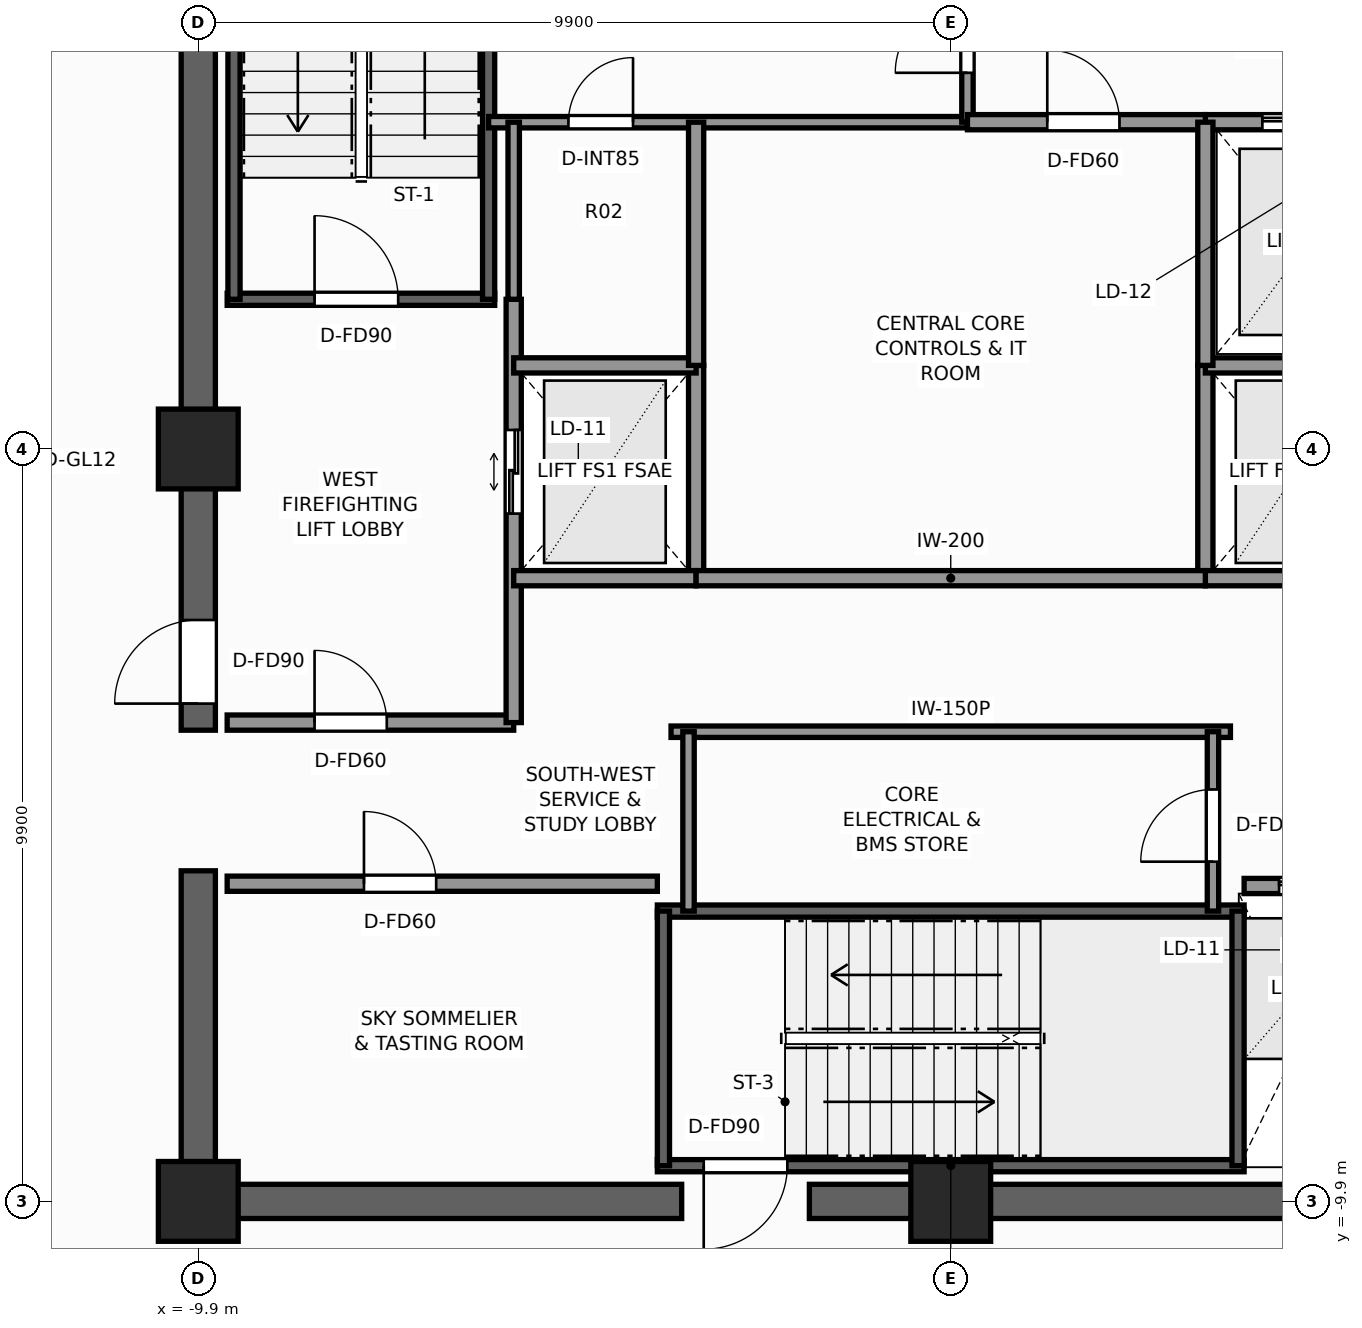
"""IFC4 building model, lengths in metres.
Left out: names, types, materials, properties, quantities, classifications, styles, units other than length and angle.
Written with IfcOpenShell. Run it as: python <this file> out.ifc"""

import sys

from ifc_helpers import new_model, si_unit, direction, frame, frame_2d, origin, origin_2d, place, context, subcontext, project, spatial, rectangle, extrude, element, fill, save


model = new_model("IFC4")
c1 = context("Model", 3, precision=1e-05, world=origin(), true_north=direction((0.0, 1.0)))
c2 = subcontext(c1, "Body", "Model", "MODEL_VIEW")
j1 = project(units=[si_unit("LENGTHUNIT", "METRE"), si_unit("PLANEANGLEUNIT", "RADIAN")], contexts=[c1])
p1 = place(None, origin())
s1 = spatial("IfcSite", under=j1, at=p1, CompositionType="ELEMENT")
p2 = place(p1, origin())
s2 = spatial("IfcBuilding", under=s1, at=p2, CompositionType="ELEMENT")
p3 = place(p2, frame((0.0, 0.0, 262.8)))
s3 = spatial("IfcBuildingStorey", under=s2, at=p3, CompositionType="ELEMENT", Elevation=262.8)
p4 = place(p3, frame((10.125, -9.9, 0.0), z_axis=(0.0, 0.0, 1.0), x_axis=(-1.0, 0.0, 0.0)))
e1 = element("IfcWall", 1, at=p4, inside=s3, PredefinedType="SHEAR", context=c2, shape_type="SweptSolid", body=[
    extrude(rectangle(XDim=11.985, YDim=0.45, at=frame_2d((5.993, 0.0))), origin(), (0.0, 0.0, 1.0), 4.6),
])
p5 = place(p3, frame((-3.54, -9.9, 0.0), z_axis=(0.0, 0.0, 1.0), x_axis=(-1.0, 0.0, 0.0)))
e2 = element("IfcWall", 2, at=p5, inside=s3, PredefinedType="SHEAR", context=c2, shape_type="SweptSolid", body=[
    extrude(rectangle(XDim=6.585, YDim=0.45, at=frame_2d((3.292, 0.0))), origin(), (0.0, 0.0, 1.0), 4.6),
])
p6 = place(p3, frame((-9.9, -9.675, 0.0), z_axis=(0.0, 0.0, 1.0), x_axis=(0.0, 1.0, 0.0)))
e3 = element("IfcWall", 3, at=p6, inside=s3, PredefinedType="SHEAR", context=c2, shape_type="SweptSolid", body=[
    extrude(rectangle(XDim=4.125, YDim=0.45, at=frame_2d((2.062, 0.0))), origin(), (0.0, 0.0, 1.0), 4.6),
])
p7 = place(p3, frame((-9.9, -3.7, 0.0), z_axis=(0.0, 0.0, 1.0), x_axis=(0.0, 1.0, 0.0)))
e4 = element("IfcWall", 4, at=p7, inside=s3, PredefinedType="SHEAR", context=c2, shape_type="SweptSolid", body=[
    extrude(rectangle(XDim=13.375, YDim=0.45, at=frame_2d((6.688, 0.0))), origin(), (0.0, 0.0, 1.0), 4.6),
])
p8 = place(p7, frame((0.35, 0.0, 0.0)))
e5 = element("IfcOpeningElement", 5, at=p8, cuts=e4, PredefinedType="OPENING", context=c2, shape_type="SweptSolid", body=[
    extrude(rectangle(XDim=1.1, YDim=2.2, at=frame_2d((0.55, 1.1))), frame((0.0, 0.235, 0.0), z_axis=(0.0, -1.0, 0.0), x_axis=(1.0, 0.0, 0.0)), (0.0, 0.0, 1.0), 0.47),
])
for number, where, z_axis, x_axis in (
    (6, (-9.9, -9.9, 0.0), (0.0, 0.0, 1.0), (1.0, 0.0, 0.0)),
    (7, (0.0, -9.9, 0.0), (0.0, 0.0, 1.0), (1.0, 0.0, 0.0)),
    (8, (-9.9, 0.0, 0.0), (0.0, 0.0, 1.0), (1.0, 0.0, 0.0)),
):
    element("IfcColumn", number, at=place(p3, frame(where, z_axis=z_axis, x_axis=x_axis)), inside=s3, PredefinedType="COLUMN", context=c2, shape_type="SweptSolid", body=[
        extrude(rectangle(XDim=1.05, YDim=1.05, at=origin_2d()), origin(), (0.0, 0.0, 1.0), 4.6),
    ])
p9 = place(p3, frame((-9.52, 1.97, 0.0), z_axis=(0.0, 0.0, 1.0), x_axis=(1.0, 0.0, 0.0)))
e9 = element("IfcWall", 9, at=p9, inside=s3, PredefinedType="SHEAR", context=c2, shape_type="SweptSolid", body=[
    extrude(rectangle(XDim=3.52, YDim=0.16, at=frame_2d((1.76, 0.0))), origin(), (0.0, 0.0, 1.0), 4.6),
])
p10 = place(p9, frame((1.15, 0.0, 0.0)))
e10 = element("IfcOpeningElement", 10, at=p10, cuts=e9, PredefinedType="OPENING", context=c2, shape_type="SweptSolid", body=[
    extrude(rectangle(XDim=1.1, YDim=2.2, at=frame_2d((0.55, 1.1))), frame((0.0, 0.09, 0.0), z_axis=(0.0, -1.0, 0.0), x_axis=(1.0, 0.0, 0.0)), (0.0, 0.0, 1.0), 0.18),
])
for number, where, z_axis, x_axis in (
    (11, (-9.43, 1.97, 0.0), (0.0, 0.0, 1.0), (0.0, 1.0, 0.0)),
    (12, (-6.08, 1.97, 0.0), (0.0, 0.0, 1.0), (0.0, 1.0, 0.0)),
):
    element("IfcWall", number, at=place(p3, frame(where, z_axis=z_axis, x_axis=x_axis)), inside=s3, PredefinedType="SHEAR", context=c2, shape_type="SweptSolid", body=[
        extrude(rectangle(XDim=7.56, YDim=0.16, at=frame_2d((3.78, 0.0))), origin(), (0.0, 0.0, 1.0), 4.6),
    ])
p11 = place(p3, frame((3.86, -9.43, 0.0), z_axis=(0.0, 0.0, 1.0), x_axis=(-1.0, 0.0, 0.0)))
e13 = element("IfcWall", 13, at=p11, inside=s3, PredefinedType="SHEAR", context=c2, shape_type="SweptSolid", body=[
    extrude(rectangle(XDim=7.72, YDim=0.16, at=frame_2d((3.86, 0.0))), origin(), (0.0, 0.0, 1.0), 4.6),
])
p12 = place(p11, frame((6.01, 0.0, 0.0)))
e14 = element("IfcOpeningElement", 14, at=p12, cuts=e13, PredefinedType="OPENING", context=c2, shape_type="SweptSolid", body=[
    extrude(rectangle(XDim=1.1, YDim=2.2, at=frame_2d((0.55, 1.1))), frame((0.0, 0.09, 0.0), z_axis=(0.0, -1.0, 0.0), x_axis=(1.0, 0.0, 0.0)), (0.0, 0.0, 1.0), 0.18),
])
p13 = place(p3, frame((-3.86, -6.08, 0.0), z_axis=(0.0, 0.0, 1.0), x_axis=(1.0, 0.0, 0.0)))
e15 = element("IfcWall", 15, at=p13, inside=s3, PredefinedType="SHEAR", context=c2, shape_type="SweptSolid", body=[
    extrude(rectangle(XDim=7.72, YDim=0.16, at=frame_2d((3.86, 0.0))), origin(), (0.0, 0.0, 1.0), 4.6),
])
for number, where, z_axis, x_axis in (
    (16, (-3.78, -9.43, 0.0), (0.0, 0.0, 1.0), (0.0, 1.0, 0.0)),
    (17, (3.78, -9.43, 0.0), (0.0, 0.0, 1.0), (0.0, 1.0, 0.0)),
):
    element("IfcWall", number, at=place(p3, frame(where, z_axis=z_axis, x_axis=x_axis)), inside=s3, PredefinedType="SHEAR", context=c2, shape_type="SweptSolid", body=[
        extrude(rectangle(XDim=3.35, YDim=0.16, at=frame_2d((1.675, 0.0))), origin(), (0.0, 0.0, 1.0), 4.6),
    ])
p14 = place(p3, frame((-9.52, -3.6, 0.0), z_axis=(0.0, 0.0, 1.0), x_axis=(1.0, 0.0, 0.0)))
e18 = element("IfcWall", 18, at=p14, inside=s3, PredefinedType="SOLIDWALL", context=c2, shape_type="SweptSolid", body=[
    extrude(rectangle(XDim=3.77, YDim=0.2, at=frame_2d((1.885, 0.0))), origin(), (0.0, 0.0, 1.0), 4.32),
])
p15 = place(p14, frame((1.15, 0.0, 0.0)))
e19 = element("IfcOpeningElement", 19, at=p15, cuts=e18, PredefinedType="OPENING", context=c2, shape_type="SweptSolid", body=[
    extrude(rectangle(XDim=0.95, YDim=2.06, at=frame_2d((0.475, 1.03))), frame((0.0, 0.11, 0.0), z_axis=(0.0, -1.0, 0.0), x_axis=(1.0, 0.0, 0.0)), (0.0, 0.0, 1.0), 0.22),
])
p16 = place(p3, frame((-5.75, -3.6, 0.0), z_axis=(0.0, 0.0, 1.0), x_axis=(0.0, 1.0, 0.0)))
e20 = element("IfcWall", 20, at=p16, inside=s3, PredefinedType="SOLIDWALL", context=c2, shape_type="SweptSolid", body=[
    extrude(rectangle(XDim=5.57, YDim=0.2, at=frame_2d((2.785, 0.0))), origin(), (0.0, 0.0, 1.0), 4.32),
])
p17 = place(p16, frame((2.75, 0.0, 0.0)))
e21 = element("IfcOpeningElement", 21, at=p17, cuts=e20, PredefinedType="OPENING", context=c2, shape_type="SweptSolid", body=[
    extrude(rectangle(XDim=1.1, YDim=2.2, at=frame_2d((0.55, 1.1))), frame((0.0, 0.11, 0.0), z_axis=(0.0, -1.0, 0.0), x_axis=(1.0, 0.0, 0.0)), (0.0, 0.0, 1.0), 0.22),
])
p18 = place(p3, frame((-3.35, -1.7, 0.0), z_axis=(0.0, 0.0, 1.0), x_axis=(0.0, 1.0, 0.0)))
e22 = element("IfcWall", 22, at=p18, inside=s3, PredefinedType="SOLIDWALL", context=c2, shape_type="SweptSolid", body=[
    extrude(rectangle(XDim=2.8, YDim=0.2, at=frame_2d((1.4, 0.0))), origin(), (0.0, 0.0, 1.0), 4.32),
])
for number, where, z_axis, x_axis in (
    (23, (-5.75, -1.7, 0.0), (0.0, 0.0, 1.0), (1.0, 0.0, 0.0)),
    (24, (-5.75, 1.1, 0.0), (0.0, 0.0, 1.0), (1.0, 0.0, 0.0)),
):
    element("IfcWall", number, at=place(p3, frame(where, z_axis=z_axis, x_axis=x_axis)), inside=s3, PredefinedType="SOLIDWALL", context=c2, shape_type="SweptSolid", body=[
        extrude(rectangle(XDim=2.4, YDim=0.2, at=frame_2d((1.2, 0.0))), origin(), (0.0, 0.0, 1.0), 4.32),
    ])
p19 = place(p3, frame((3.35, -1.7, 0.0), z_axis=(0.0, 0.0, 1.0), x_axis=(0.0, 1.0, 0.0)))
e25 = element("IfcWall", 25, at=p19, inside=s3, PredefinedType="SOLIDWALL", context=c2, shape_type="SweptSolid", body=[
    extrude(rectangle(XDim=2.8, YDim=0.2, at=frame_2d((1.4, 0.0))), origin(), (0.0, 0.0, 1.0), 4.32),
])
for number, where, z_axis, x_axis in (
    (26, (3.35, -1.7, 0.0), (0.0, 0.0, 1.0), (1.0, 0.0, 0.0)),
    (27, (3.35, 1.1, 0.0), (0.0, 0.0, 1.0), (1.0, 0.0, 0.0)),
):
    element("IfcWall", number, at=place(p3, frame(where, z_axis=z_axis, x_axis=x_axis)), inside=s3, PredefinedType="SOLIDWALL", context=c2, shape_type="SweptSolid", body=[
        extrude(rectangle(XDim=2.4, YDim=0.2, at=frame_2d((1.2, 0.0))), origin(), (0.0, 0.0, 1.0), 4.32),
    ])
p20 = place(p3, frame((3.35, 4.3, 0.0), z_axis=(0.0, 0.0, 1.0), x_axis=(1.0, 0.0, 0.0)))
e28 = element("IfcWall", 28, at=p20, inside=s3, PredefinedType="SOLIDWALL", context=c2, shape_type="SweptSolid", body=[
    extrude(rectangle(XDim=2.73, YDim=0.2, at=frame_2d((1.365, 0.0))), origin(), (0.0, 0.0, 1.0), 4.32),
])
p21 = place(p20, frame((0.75, 0.0, 0.0)))
e29 = element("IfcOpeningElement", 29, at=p21, cuts=e28, PredefinedType="OPENING", context=c2, shape_type="SweptSolid", body=[
    extrude(rectangle(XDim=1.2, YDim=2.25, at=frame_2d((0.6, 1.125))), frame((0.0, 0.11, 0.0), z_axis=(0.0, -1.0, 0.0), x_axis=(1.0, 0.0, 0.0)), (0.0, 0.0, 1.0), 0.22),
])
p22 = place(p3, frame((-6.08, 4.3, 0.0), z_axis=(0.0, 0.0, 1.0), x_axis=(1.0, 0.0, 0.0)))
e30 = element("IfcWall", 30, at=p22, inside=s3, PredefinedType="PARTITIONING", context=c2, shape_type="SweptSolid", body=[
    extrude(rectangle(XDim=6.3, YDim=0.15, at=frame_2d((3.15, 0.0))), origin(), (0.0, 0.0, 1.0), 4.32),
])
p23 = place(p22, frame((1.05, 0.0, 0.0)))
e31 = element("IfcOpeningElement", 31, at=p23, cuts=e30, PredefinedType="OPENING", context=c2, shape_type="SweptSolid", body=[
    extrude(rectangle(XDim=0.85, YDim=2.03, at=frame_2d((0.425, 1.015))), frame((0.0, 0.085, 0.0), z_axis=(0.0, -1.0, 0.0), x_axis=(1.0, 0.0, 0.0)), (0.0, 0.0, 1.0), 0.17),
])
p24 = place(p3, frame((0.22, 4.3, 0.0), z_axis=(0.0, 0.0, 1.0), x_axis=(0.0, 1.0, 0.0)))
e32 = element("IfcWall", 32, at=p24, inside=s3, PredefinedType="PARTITIONING", context=c2, shape_type="SweptSolid", body=[
    extrude(rectangle(XDim=5.22, YDim=0.15, at=frame_2d((2.61, 0.0))), origin(), (0.0, 0.0, 1.0), 4.32),
])
p25 = place(p24, frame((0.65, 0.0, 0.0)))
e33 = element("IfcOpeningElement", 33, at=p25, cuts=e32, PredefinedType="OPENING", context=c2, shape_type="SweptSolid", body=[
    extrude(rectangle(XDim=0.95, YDim=2.06, at=frame_2d((0.475, 1.03))), frame((0.0, 0.085, 0.0), z_axis=(0.0, -1.0, 0.0), x_axis=(1.0, 0.0, 0.0)), (0.0, 0.0, 1.0), 0.17),
])
p26 = place(p3, frame((-9.52, -5.72, 0.0), z_axis=(0.0, 0.0, 1.0), x_axis=(1.0, 0.0, 0.0)))
e34 = element("IfcWall", 34, at=p26, inside=s3, PredefinedType="SOLIDWALL", context=c2, shape_type="SweptSolid", body=[
    extrude(rectangle(XDim=5.66, YDim=0.2, at=frame_2d((2.83, 0.0))), origin(), (0.0, 0.0, 1.0), 4.32),
])
p27 = place(p26, frame((1.8, 0.0, 0.0)))
e35 = element("IfcOpeningElement", 35, at=p27, cuts=e34, PredefinedType="OPENING", context=c2, shape_type="SweptSolid", body=[
    extrude(rectangle(XDim=0.95, YDim=2.06, at=frame_2d((0.475, 1.03))), frame((0.0, 0.11, 0.0), z_axis=(0.0, -1.0, 0.0), x_axis=(1.0, 0.0, 0.0)), (0.0, 0.0, 1.0), 0.22),
])
p28 = place(p3, frame((3.86, -5.75, 0.0), z_axis=(0.0, 0.0, 1.0), x_axis=(1.0, 0.0, 0.0)))
e36 = element("IfcWall", 36, at=p28, inside=s3, PredefinedType="SOLIDWALL", context=c2, shape_type="SweptSolid", body=[
    extrude(rectangle(XDim=5.66, YDim=0.2, at=frame_2d((2.83, 0.0))), origin(), (0.0, 0.0, 1.0), 4.32),
])
p29 = place(p28, frame((0.46, 0.0, 0.0)))
e37 = element("IfcOpeningElement", 37, at=p29, cuts=e36, PredefinedType="OPENING", context=c2, shape_type="SweptSolid", body=[
    extrude(rectangle(XDim=1.1, YDim=2.2, at=frame_2d((0.55, 1.1))), frame((0.0, 0.11, 0.0), z_axis=(0.0, -1.0, 0.0), x_axis=(1.0, 0.0, 0.0)), (0.0, 0.0, 1.0), 0.22),
])
p30 = place(p28, frame((2.39, 0.0, 0.0)))
e38 = element("IfcOpeningElement", 38, at=p30, cuts=e36, PredefinedType="OPENING", context=c2, shape_type="SweptSolid", body=[
    extrude(rectangle(XDim=1.1, YDim=2.2, at=frame_2d((0.55, 1.1))), frame((0.0, 0.11, 0.0), z_axis=(0.0, -1.0, 0.0), x_axis=(1.0, 0.0, 0.0)), (0.0, 0.0, 1.0), 0.22),
])
p31 = place(p28, frame((4.32, 0.0, 0.0)))
e39 = element("IfcOpeningElement", 39, at=p31, cuts=e36, PredefinedType="OPENING", context=c2, shape_type="SweptSolid", body=[
    extrude(rectangle(XDim=1.1, YDim=2.2, at=frame_2d((0.55, 1.1))), frame((0.0, 0.11, 0.0), z_axis=(0.0, -1.0, 0.0), x_axis=(1.0, 0.0, 0.0)), (0.0, 0.0, 1.0), 0.22),
])
p32 = place(p3, frame((0.22, 4.3, 0.0), z_axis=(0.0, 0.0, 1.0), x_axis=(1.0, 0.0, 0.0)))
e40 = element("IfcWall", 40, at=p32, inside=s3, PredefinedType="SOLIDWALL", context=c2, shape_type="SweptSolid", body=[
    extrude(rectangle(XDim=3.13, YDim=0.2, at=frame_2d((1.565, 0.0))), origin(), (0.0, 0.0, 1.0), 4.32),
])
p33 = place(p32, frame((1.05, 0.0, 0.0)))
e41 = element("IfcOpeningElement", 41, at=p33, cuts=e40, PredefinedType="OPENING", context=c2, shape_type="SweptSolid", body=[
    extrude(rectangle(XDim=0.95, YDim=2.06, at=frame_2d((0.475, 1.03))), frame((0.0, 0.11, 0.0), z_axis=(0.0, -1.0, 0.0), x_axis=(1.0, 0.0, 0.0)), (0.0, 0.0, 1.0), 0.22),
])
p34 = place(p3, frame((-3.35, -1.7, 0.0), z_axis=(0.0, 0.0, 1.0), x_axis=(1.0, 0.0, 0.0)))
e42 = element("IfcWall", 42, at=p34, inside=s3, PredefinedType="SOLIDWALL", context=c2, shape_type="SweptSolid", body=[
    extrude(rectangle(XDim=6.7, YDim=0.2, at=frame_2d((3.35, 0.0))), origin(), (0.0, 0.0, 1.0), 4.32),
])
for number, where, z_axis, x_axis in (
    (43, (-3.35, 1.1, 0.0), (0.0, 0.0, 1.0), (0.0, 1.0, 0.0)),
    (44, (3.35, 1.1, 0.0), (0.0, 0.0, 1.0), (0.0, 1.0, 0.0)),
):
    element("IfcWall", number, at=place(p3, frame(where, z_axis=z_axis, x_axis=x_axis)), inside=s3, PredefinedType="SOLIDWALL", context=c2, shape_type="SweptSolid", body=[
        extrude(rectangle(XDim=3.2, YDim=0.2, at=frame_2d((1.6, 0.0))), origin(), (0.0, 0.0, 1.0), 4.32),
    ])
p35 = place(p3, frame((-3.68, -3.72, 0.0), z_axis=(0.0, 0.0, 1.0), x_axis=(1.0, 0.0, 0.0)))
e45 = element("IfcWall", 45, at=p35, inside=s3, PredefinedType="PARTITIONING", context=c2, shape_type="SweptSolid", body=[
    extrude(rectangle(XDim=7.36, YDim=0.15, at=frame_2d((3.68, 0.0))), origin(), (0.0, 0.0, 1.0), 4.32),
])
p36 = place(p3, frame((3.45, -6.08, 0.0), z_axis=(0.0, 0.0, 1.0), x_axis=(0.0, 1.0, 0.0)))
e46 = element("IfcWall", 46, at=p36, inside=s3, PredefinedType="PARTITIONING", context=c2, shape_type="SweptSolid", body=[
    extrude(rectangle(XDim=2.36, YDim=0.15, at=frame_2d((1.18, 0.0))), origin(), (0.0, 0.0, 1.0), 4.32),
])
p37 = place(p36, frame((0.65, 0.0, 0.0)))
e47 = element("IfcOpeningElement", 47, at=p37, cuts=e46, PredefinedType="OPENING", context=c2, shape_type="SweptSolid", body=[
    extrude(rectangle(XDim=0.95, YDim=2.06, at=frame_2d((0.475, 1.03))), frame((0.0, 0.085, 0.0), z_axis=(0.0, -1.0, 0.0), x_axis=(1.0, 0.0, 0.0)), (0.0, 0.0, 1.0), 0.17),
])
p38 = place(p3, frame((-3.45, -6.08, 0.0), z_axis=(0.0, 0.0, 1.0), x_axis=(0.0, 1.0, 0.0)))
e48 = element("IfcWall", 48, at=p38, inside=s3, PredefinedType="PARTITIONING", context=c2, shape_type="SweptSolid", body=[
    extrude(rectangle(XDim=2.36, YDim=0.15, at=frame_2d((1.18, 0.0))), origin(), (0.0, 0.0, 1.0), 4.32),
])
p39 = place(p3, frame((-5.75, 1.97, 0.0), z_axis=(0.0, 0.0, 1.0), x_axis=(0.0, 1.0, 0.0)))
e49 = element("IfcWall", 49, at=p39, inside=s3, PredefinedType="PARTITIONING", context=c2, shape_type="SweptSolid", body=[
    extrude(rectangle(XDim=2.33, YDim=0.15, at=frame_2d((1.165, 0.0))), origin(), (0.0, 0.0, 1.0), 4.32),
])
p40 = place(p10, origin())
e50 = element("IfcDoor", 50, at=p40, inside=s3, OperationType="SINGLE_SWING_LEFT", PredefinedType="DOOR", context=c2, shape_type="SweptSolid", body=[
    extrude(rectangle(XDim=1.1, YDim=2.2, at=frame_2d((0.55, 1.1))), frame((0.0, 0.025, 0.0), z_axis=(0.0, -1.0, 0.0), x_axis=(1.0, 0.0, 0.0)), (0.0, 0.0, 1.0), 0.05),
])
fill(e10, e50)
p41 = place(p12, origin())
e51 = element("IfcDoor", 51, at=p41, inside=s3, OperationType="SINGLE_SWING_RIGHT", PredefinedType="DOOR", context=c2, shape_type="SweptSolid", body=[
    extrude(rectangle(XDim=1.1, YDim=2.2, at=frame_2d((0.55, 1.1))), frame((0.0, 0.025, 0.0), z_axis=(0.0, -1.0, 0.0), x_axis=(1.0, 0.0, 0.0)), (0.0, 0.0, 1.0), 0.05),
])
fill(e14, e51)
p42 = place(p8, origin())
e52 = element("IfcDoor", 52, at=p42, inside=s3, OperationType="SINGLE_SWING_LEFT", PredefinedType="DOOR", context=c2, shape_type="SweptSolid", body=[
    extrude(rectangle(XDim=1.1, YDim=2.2, at=frame_2d((0.55, 1.1))), frame((0.0, 0.025, 0.0), z_axis=(0.0, -1.0, 0.0), x_axis=(1.0, 0.0, 0.0)), (0.0, 0.0, 1.0), 0.05),
])
fill(e5, e52)
p43 = place(p17, origin())
e53 = element("IfcDoor", 53, at=p43, inside=s3, OperationType="DOUBLE_DOOR_SLIDING", PredefinedType="DOOR", context=c2, shape_type="SweptSolid", body=[
    extrude(rectangle(XDim=1.1, YDim=2.2, at=frame_2d((0.55, 1.1))), frame((0.0, 0.025, 0.0), z_axis=(0.0, -1.0, 0.0), x_axis=(1.0, 0.0, 0.0)), (0.0, 0.0, 1.0), 0.05),
])
fill(e21, e53)
p44 = place(p21, origin())
e54 = element("IfcDoor", 54, at=p44, inside=s3, OperationType="DOUBLE_DOOR_SLIDING", PredefinedType="DOOR", context=c2, shape_type="SweptSolid", body=[
    extrude(rectangle(XDim=1.2, YDim=2.25, at=frame_2d((0.6, 1.125))), frame((0.0, 0.025, 0.0), z_axis=(0.0, -1.0, 0.0), x_axis=(1.0, 0.0, 0.0)), (0.0, 0.0, 1.0), 0.05),
])
fill(e29, e54)
p45 = place(p25, origin())
e55 = element("IfcDoor", 55, at=p45, inside=s3, OperationType="SINGLE_SWING_LEFT", PredefinedType="DOOR", context=c2, shape_type="SweptSolid", body=[
    extrude(rectangle(XDim=0.95, YDim=2.06, at=frame_2d((0.475, 1.03))), frame((0.0, 0.025, 0.0), z_axis=(0.0, -1.0, 0.0), x_axis=(1.0, 0.0, 0.0)), (0.0, 0.0, 1.0), 0.05),
])
fill(e33, e55)
p46 = place(p27, origin())
e56 = element("IfcDoor", 56, at=p46, inside=s3, OperationType="SINGLE_SWING_LEFT", PredefinedType="DOOR", context=c2, shape_type="SweptSolid", body=[
    extrude(rectangle(XDim=0.95, YDim=2.06, at=frame_2d((0.475, 1.03))), frame((0.0, 0.025, 0.0), z_axis=(0.0, -1.0, 0.0), x_axis=(1.0, 0.0, 0.0)), (0.0, 0.0, 1.0), 0.05),
])
fill(e35, e56)
p47 = place(p15, origin())
e57 = element("IfcDoor", 57, at=p47, inside=s3, OperationType="SINGLE_SWING_LEFT", PredefinedType="DOOR", context=c2, shape_type="SweptSolid", body=[
    extrude(rectangle(XDim=0.95, YDim=2.06, at=frame_2d((0.475, 1.03))), frame((0.0, 0.025, 0.0), z_axis=(0.0, -1.0, 0.0), x_axis=(1.0, 0.0, 0.0)), (0.0, 0.0, 1.0), 0.05),
])
fill(e19, e57)
p48 = place(p29, origin())
e58 = element("IfcDoor", 58, at=p48, inside=s3, OperationType="DOUBLE_DOOR_SLIDING", PredefinedType="DOOR", context=c2, shape_type="SweptSolid", body=[
    extrude(rectangle(XDim=1.1, YDim=2.2, at=frame_2d((0.55, 1.1))), frame((0.0, 0.025, 0.0), z_axis=(0.0, -1.0, 0.0), x_axis=(1.0, 0.0, 0.0)), (0.0, 0.0, 1.0), 0.05),
])
fill(e37, e58)
p49 = place(p33, origin())
e59 = element("IfcDoor", 59, at=p49, inside=s3, OperationType="SINGLE_SWING_LEFT", PredefinedType="DOOR", context=c2, shape_type="SweptSolid", body=[
    extrude(rectangle(XDim=0.95, YDim=2.06, at=frame_2d((0.475, 1.03))), frame((0.0, 0.025, 0.0), z_axis=(0.0, -1.0, 0.0), x_axis=(1.0, 0.0, 0.0)), (0.0, 0.0, 1.0), 0.05),
])
fill(e41, e59)
p50 = place(p37, origin())
e60 = element("IfcDoor", 60, at=p50, inside=s3, OperationType="SINGLE_SWING_LEFT", PredefinedType="DOOR", context=c2, shape_type="SweptSolid", body=[
    extrude(rectangle(XDim=0.95, YDim=2.06, at=frame_2d((0.475, 1.03))), frame((0.0, 0.025, 0.0), z_axis=(0.0, -1.0, 0.0), x_axis=(1.0, 0.0, 0.0)), (0.0, 0.0, 1.0), 0.05),
])
fill(e47, e60)
p51 = place(p23, origin())
e61 = element("IfcDoor", 61, at=p51, inside=s3, OperationType="SINGLE_SWING_RIGHT", PredefinedType="DOOR", context=c2, shape_type="SweptSolid", body=[
    extrude(rectangle(XDim=0.85, YDim=2.03, at=frame_2d((0.425, 1.015))), frame((0.0, 0.025, 0.0), z_axis=(0.0, -1.0, 0.0), x_axis=(1.0, 0.0, 0.0)), (0.0, 0.0, 1.0), 0.05),
])
fill(e31, e61)
save(model, sys.argv[1])
